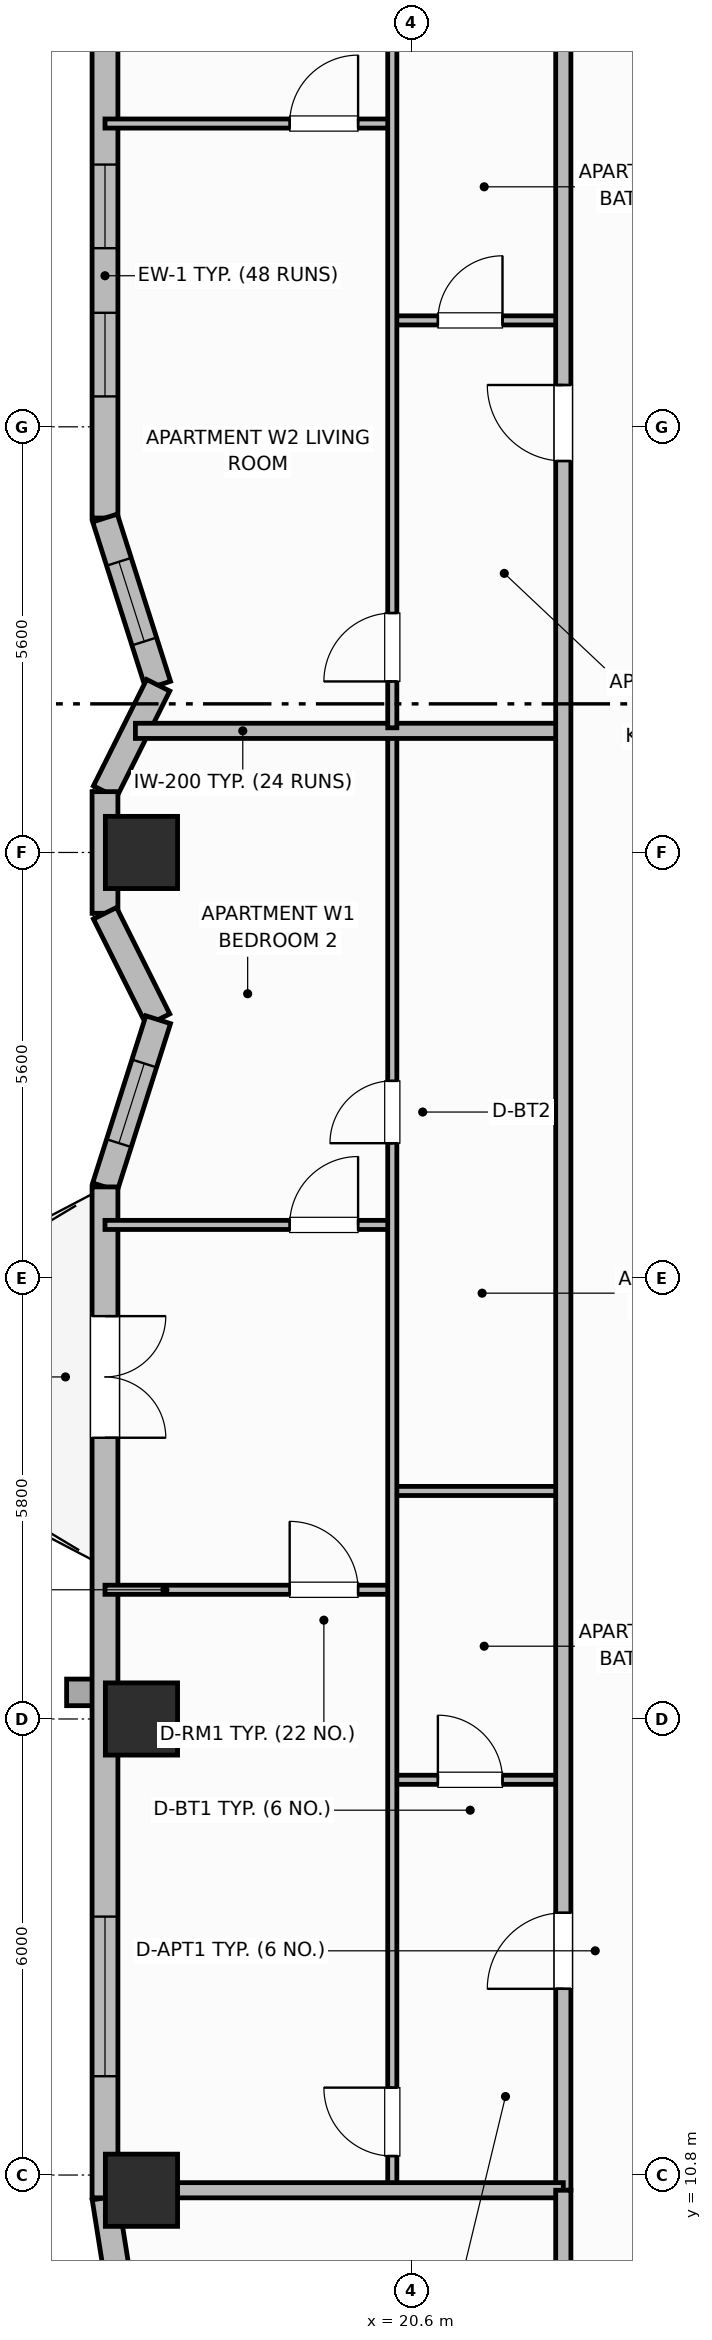
"""IFC4 building model, lengths in metres.
Left out: names, types, materials, properties, quantities, classifications, styles, units other than length and angle.
Written with IfcOpenShell. Run it as: python <this file> out.ifc"""

import sys

from ifc_helpers import new_model, si_unit, direction, frame, frame_2d, origin, origin_2d, place, context, subcontext, project, spatial, rectangle, extrude, element, fill, save


model = new_model("IFC4")
c1 = context("Model", 3, precision=1e-05, world=origin(), true_north=direction((0.0, 1.0)))
c2 = subcontext(c1, "Body", "Model", "MODEL_VIEW")
j1 = project(units=[si_unit("LENGTHUNIT", "METRE"), si_unit("PLANEANGLEUNIT", "RADIAN")], contexts=[c1])
p1 = place(None, origin())
s1 = spatial("IfcSite", under=j1, at=p1, CompositionType="ELEMENT")
p2 = place(p1, origin())
s2 = spatial("IfcBuilding", under=s1, at=p2, CompositionType="ELEMENT")
p3 = place(p2, frame((0.0, 0.0, 177.4)))
s3 = spatial("IfcBuildingStorey", under=s2, at=p3, CompositionType="ELEMENT", Elevation=177.4)
for number, where, z_axis, x_axis in (
    (1, (17.05, 10.6, 0.0), (0.0, 0.0, 1.0), (1.0, 0.0, 0.0)),
    (2, (17.05, 16.8, 0.0), (0.0, 0.0, 1.0), (1.0, 0.0, 0.0)),
    (3, (17.05, 28.2, 0.0), (0.0, 0.0, 1.0), (1.0, 0.0, 0.0)),
):
    element("IfcColumn", number, at=place(p3, frame(where, z_axis=z_axis, x_axis=x_axis)), inside=s3, PredefinedType="COLUMN", context=c2, shape_type="SweptSolid", body=[
        extrude(rectangle(XDim=0.95, YDim=0.95, at=origin_2d()), origin(), (0.0, 0.0, 1.0), 3.7),
    ])
p4 = place(p3, frame((16.57, 10.5, 0.0), z_axis=(0.0, 0.0, 1.0), x_axis=(0.156514556949, -0.987675651954, 0.0)))
e4 = element("IfcWall", 4, at=p4, inside=s3, PredefinedType="SOLIDWALL", context=c2, shape_type="SweptSolid", body=[
    extrude(rectangle(XDim=1.135, YDim=0.34, at=frame_2d((0.568, 0.0))), origin(), (0.0, 0.0, 1.0), 2.72),
])
p5 = place(p3, frame((16.57, 45.9, 0.0), z_axis=(0.0, 0.0, 1.0), x_axis=(0.0, -1.0, 0.0)))
e5 = element("IfcWall", 5, at=p5, inside=s3, PredefinedType="SOLIDWALL", context=c2, shape_type="SweptSolid", body=[
    extrude(rectangle(XDim=13.3, YDim=0.34, at=frame_2d((6.65, 0.0))), origin(), (0.0, 0.0, 1.0), 2.72),
])
p6 = place(p5, frame((1.6, 0.0, 0.95)))
e6 = element("IfcOpeningElement", 6, at=p6, cuts=e5, PredefinedType="OPENING", context=c2, shape_type="SweptSolid", body=[
    extrude(rectangle(XDim=1.1, YDim=1.65, at=frame_2d((0.55, 0.825))), frame((0.0, 0.18, 0.0), z_axis=(0.0, -1.0, 0.0), x_axis=(1.0, 0.0, 0.0)), (0.0, 0.0, 1.0), 0.36),
])
p7 = place(p5, frame((3.9, 0.0, 0.95)))
e7 = element("IfcOpeningElement", 7, at=p7, cuts=e5, PredefinedType="OPENING", context=c2, shape_type="SweptSolid", body=[
    extrude(rectangle(XDim=1.1, YDim=1.65, at=frame_2d((0.55, 0.825))), frame((0.0, 0.18, 0.0), z_axis=(0.0, -1.0, 0.0), x_axis=(1.0, 0.0, 0.0)), (0.0, 0.0, 1.0), 0.36),
])
p8 = place(p5, frame((8.65, 0.0, 0.95)))
e8 = element("IfcOpeningElement", 8, at=p8, cuts=e5, PredefinedType="OPENING", context=c2, shape_type="SweptSolid", body=[
    extrude(rectangle(XDim=1.1, YDim=1.65, at=frame_2d((0.55, 0.825))), frame((0.0, 0.18, 0.0), z_axis=(0.0, -1.0, 0.0), x_axis=(1.0, 0.0, 0.0)), (0.0, 0.0, 1.0), 0.36),
])
p9 = place(p5, frame((10.6, 0.0, 0.95)))
e9 = element("IfcOpeningElement", 9, at=p9, cuts=e5, PredefinedType="OPENING", context=c2, shape_type="SweptSolid", body=[
    extrude(rectangle(XDim=1.1, YDim=1.65, at=frame_2d((0.55, 0.825))), frame((0.0, 0.18, 0.0), z_axis=(0.0, -1.0, 0.0), x_axis=(1.0, 0.0, 0.0)), (0.0, 0.0, 1.0), 0.36),
])
p10 = place(p3, frame((16.57, 32.6, 0.0), z_axis=(0.0, 0.0, 1.0), x_axis=(0.303160011437, -0.952939666225, 0.0)))
e10 = element("IfcWall", 10, at=p10, inside=s3, PredefinedType="SOLIDWALL", context=c2, shape_type="SweptSolid", body=[
    extrude(rectangle(XDim=2.309, YDim=0.34, at=frame_2d((1.154, 0.0))), origin(), (0.0, 0.0, 1.0), 2.72),
])
p11 = place(p10, frame((0.604, 0.0, 0.91)))
e11 = element("IfcOpeningElement", 11, at=p11, cuts=e10, PredefinedType="OPENING", context=c2, shape_type="SweptSolid", body=[
    extrude(rectangle(XDim=1.1, YDim=1.65, at=frame_2d((0.55, 0.825))), frame((0.0, 0.18, 0.0), z_axis=(0.0, -1.0, 0.0), x_axis=(1.0, 0.0, 0.0)), (0.0, 0.0, 1.0), 0.36),
])
p12 = place(p3, frame((17.27, 30.4, 0.0), z_axis=(0.0, 0.0, 1.0), x_axis=(-0.4472135955, -0.894427191, 0.0)))
e12 = element("IfcWall", 12, at=p12, inside=s3, PredefinedType="SOLIDWALL", context=c2, shape_type="SweptSolid", body=[
    extrude(rectangle(XDim=1.565, YDim=0.34, at=frame_2d((0.783, 0.0))), origin(), (0.0, 0.0, 1.0), 2.72),
])
p13 = place(p3, frame((16.57, 29.0, 0.0), z_axis=(0.0, 0.0, 1.0), x_axis=(0.0, -1.0, 0.0)))
e13 = element("IfcWall", 13, at=p13, inside=s3, PredefinedType="SOLIDWALL", context=c2, shape_type="SweptSolid", body=[
    extrude(rectangle(XDim=1.6, YDim=0.34, at=frame_2d((0.8, 0.0))), origin(), (0.0, 0.0, 1.0), 2.72),
])
p14 = place(p3, frame((16.57, 27.4, 0.0), z_axis=(0.0, 0.0, 1.0), x_axis=(0.4472135955, -0.894427191, 0.0)))
e14 = element("IfcWall", 14, at=p14, inside=s3, PredefinedType="SOLIDWALL", context=c2, shape_type="SweptSolid", body=[
    extrude(rectangle(XDim=1.565, YDim=0.34, at=frame_2d((0.783, 0.0))), origin(), (0.0, 0.0, 1.0), 2.72),
])
p15 = place(p3, frame((17.27, 26.0, 0.0), z_axis=(0.0, 0.0, 1.0), x_axis=(-0.303190562272, -0.952929946507, 0.0)))
e15 = element("IfcWall", 15, at=p15, inside=s3, PredefinedType="SOLIDWALL", context=c2, shape_type="SweptSolid", body=[
    extrude(rectangle(XDim=2.309, YDim=0.34, at=frame_2d((1.154, 0.0))), origin(), (0.0, 0.0, 1.0), 2.72),
])
p16 = place(p15, frame((0.604, 0.0, 0.91)))
e16 = element("IfcOpeningElement", 16, at=p16, cuts=e15, PredefinedType="OPENING", context=c2, shape_type="SweptSolid", body=[
    extrude(rectangle(XDim=1.1, YDim=1.65, at=frame_2d((0.55, 0.825))), frame((0.0, 0.18, 0.0), z_axis=(0.0, -1.0, 0.0), x_axis=(1.0, 0.0, 0.0)), (0.0, 0.0, 1.0), 0.36),
])
p17 = place(p3, frame((16.57, 23.8, 0.0), z_axis=(0.0, 0.0, 1.0), x_axis=(0.0, -1.0, 0.0)))
e17 = element("IfcWall", 17, at=p17, inside=s3, PredefinedType="SOLIDWALL", context=c2, shape_type="SweptSolid", body=[
    extrude(rectangle(XDim=13.3, YDim=0.34, at=frame_2d((6.65, 0.0))), origin(), (0.0, 0.0, 1.0), 2.72),
])
p18 = place(p17, frame((1.7, 0.0, 0.0)))
e18 = element("IfcOpeningElement", 18, at=p18, cuts=e17, PredefinedType="OPENING", context=c2, shape_type="SweptSolid", body=[
    extrude(rectangle(XDim=1.6, YDim=2.1, at=frame_2d((0.8, 1.05))), frame((0.0, 0.18, 0.0), z_axis=(0.0, -1.0, 0.0), x_axis=(1.0, 0.0, 0.0)), (0.0, 0.0, 1.0), 0.36),
])
p19 = place(p17, frame((9.6, 0.0, 0.7)))
e19 = element("IfcOpeningElement", 19, at=p19, cuts=e17, PredefinedType="OPENING", context=c2, shape_type="SweptSolid", body=[
    extrude(rectangle(XDim=2.1, YDim=1.9, at=frame_2d((1.05, 0.95))), frame((0.0, 0.18, 0.0), z_axis=(0.0, -1.0, 0.0), x_axis=(1.0, 0.0, 0.0)), (0.0, 0.0, 1.0), 0.36),
])
p20 = place(p3, frame((20.35, 16.0, 0.0), z_axis=(0.0, 0.0, 1.0), x_axis=(1.0, 0.0, 0.0)))
e20 = element("IfcWall", 20, at=p20, inside=s3, PredefinedType="PARTITIONING", context=c2, shape_type="SweptSolid", body=[
    extrude(rectangle(XDim=2.25, YDim=0.12, at=frame_2d((1.125, 0.0))), origin(), (0.0, 0.0, 1.0), 2.55),
])
p21 = place(p20, frame((0.6, 0.0, 0.0)))
e21 = element("IfcOpeningElement", 21, at=p21, cuts=e20, PredefinedType="OPENING", context=c2, shape_type="SweptSolid", body=[
    extrude(rectangle(XDim=0.85, YDim=2.1, at=frame_2d((0.425, 1.05))), frame((0.0, 0.07, 0.0), z_axis=(0.0, -1.0, 0.0), x_axis=(1.0, 0.0, 0.0)), (0.0, 0.0, 1.0), 0.14),
])
p22 = place(p3, frame((20.35, 19.8, 0.0), z_axis=(0.0, 0.0, 1.0), x_axis=(1.0, 0.0, 0.0)))
e22 = element("IfcWall", 22, at=p22, inside=s3, PredefinedType="PARTITIONING", context=c2, shape_type="SweptSolid", body=[
    extrude(rectangle(XDim=2.25, YDim=0.12, at=frame_2d((1.125, 0.0))), origin(), (0.0, 0.0, 1.0), 2.55),
])
p23 = place(p3, frame((16.57, 18.5, 0.0), z_axis=(0.0, 0.0, 1.0), x_axis=(1.0, 0.0, 0.0)))
e23 = element("IfcWall", 23, at=p23, inside=s3, PredefinedType="PARTITIONING", context=c2, shape_type="SweptSolid", body=[
    extrude(rectangle(XDim=3.78, YDim=0.12, at=frame_2d((1.89, 0.0))), origin(), (0.0, 0.0, 1.0), 2.55),
])
p24 = place(p23, frame((2.43, 0.0, 0.0)))
e24 = element("IfcOpeningElement", 24, at=p24, cuts=e23, PredefinedType="OPENING", context=c2, shape_type="SweptSolid", body=[
    extrude(rectangle(XDim=0.9, YDim=2.1, at=frame_2d((0.45, 1.05))), frame((0.0, 0.07, 0.0), z_axis=(0.0, -1.0, 0.0), x_axis=(1.0, 0.0, 0.0)), (0.0, 0.0, 1.0), 0.14),
])
p25 = place(p3, frame((16.57, 23.3, 0.0), z_axis=(0.0, 0.0, 1.0), x_axis=(1.0, 0.0, 0.0)))
e25 = element("IfcWall", 25, at=p25, inside=s3, PredefinedType="PARTITIONING", context=c2, shape_type="SweptSolid", body=[
    extrude(rectangle(XDim=3.78, YDim=0.12, at=frame_2d((1.89, 0.0))), origin(), (0.0, 0.0, 1.0), 2.55),
])
p26 = place(p25, frame((2.43, 0.0, 0.0)))
e26 = element("IfcOpeningElement", 26, at=p26, cuts=e25, PredefinedType="OPENING", context=c2, shape_type="SweptSolid", body=[
    extrude(rectangle(XDim=0.9, YDim=2.1, at=frame_2d((0.45, 1.05))), frame((0.0, 0.07, 0.0), z_axis=(0.0, -1.0, 0.0), x_axis=(1.0, 0.0, 0.0)), (0.0, 0.0, 1.0), 0.14),
])
p27 = place(p3, frame((20.35, 10.64, 0.0), z_axis=(0.0, 0.0, 1.0), x_axis=(0.0, 1.0, 0.0)))
e27 = element("IfcWall", 27, at=p27, inside=s3, PredefinedType="PARTITIONING", context=c2, shape_type="SweptSolid", body=[
    extrude(rectangle(XDim=19.12, YDim=0.12, at=frame_2d((9.56, 0.0))), origin(), (0.0, 0.0, 1.0), 2.55),
])
p28 = place(p27, frame((0.41, 0.0, 0.0)))
e28 = element("IfcOpeningElement", 28, at=p28, cuts=e27, PredefinedType="OPENING", context=c2, shape_type="SweptSolid", body=[
    extrude(rectangle(XDim=0.9, YDim=2.1, at=frame_2d((0.45, 1.05))), frame((0.0, 0.07, 0.0), z_axis=(0.0, -1.0, 0.0), x_axis=(1.0, 0.0, 0.0)), (0.0, 0.0, 1.0), 0.14),
])
p29 = place(p27, frame((13.735, 0.0, 0.0)))
e29 = element("IfcOpeningElement", 29, at=p29, cuts=e27, PredefinedType="OPENING", context=c2, shape_type="SweptSolid", body=[
    extrude(rectangle(XDim=0.82, YDim=2.08, at=frame_2d((0.41, 1.04))), frame((0.0, 0.07, 0.0), z_axis=(0.0, -1.0, 0.0), x_axis=(1.0, 0.0, 0.0)), (0.0, 0.0, 1.0), 0.14),
])
p30 = place(p3, frame((16.97, 29.8, 0.0), z_axis=(0.0, 0.0, 1.0), x_axis=(1.0, 0.0, 0.0)))
e30 = element("IfcWall", 30, at=p30, inside=s3, PredefinedType="PARTITIONING", context=c2, shape_type="SweptSolid", body=[
    extrude(rectangle(XDim=5.63, YDim=0.2, at=frame_2d((2.815, 0.0))), origin(), (0.0, 0.0, 1.0), 2.55),
])
p31 = place(p3, frame((20.35, 35.2, 0.0), z_axis=(0.0, 0.0, 1.0), x_axis=(1.0, 0.0, 0.0)))
e31 = element("IfcWall", 31, at=p31, inside=s3, PredefinedType="PARTITIONING", context=c2, shape_type="SweptSolid", body=[
    extrude(rectangle(XDim=2.25, YDim=0.12, at=frame_2d((1.125, 0.0))), origin(), (0.0, 0.0, 1.0), 2.55),
])
p32 = place(p31, frame((0.6, 0.0, 0.0)))
e32 = element("IfcOpeningElement", 32, at=p32, cuts=e31, PredefinedType="OPENING", context=c2, shape_type="SweptSolid", body=[
    extrude(rectangle(XDim=0.85, YDim=2.1, at=frame_2d((0.425, 1.05))), frame((0.0, 0.07, 0.0), z_axis=(0.0, -1.0, 0.0), x_axis=(1.0, 0.0, 0.0)), (0.0, 0.0, 1.0), 0.14),
])
p33 = place(p3, frame((16.57, 37.79, 0.0), z_axis=(0.0, 0.0, 1.0), x_axis=(1.0, 0.0, 0.0)))
e33 = element("IfcWall", 33, at=p33, inside=s3, PredefinedType="PARTITIONING", context=c2, shape_type="SweptSolid", body=[
    extrude(rectangle(XDim=3.78, YDim=0.12, at=frame_2d((1.89, 0.0))), origin(), (0.0, 0.0, 1.0), 2.55),
])
p34 = place(p33, frame((2.43, 0.0, 0.0)))
e34 = element("IfcOpeningElement", 34, at=p34, cuts=e33, PredefinedType="OPENING", context=c2, shape_type="SweptSolid", body=[
    extrude(rectangle(XDim=0.9, YDim=2.1, at=frame_2d((0.45, 1.05))), frame((0.0, 0.07, 0.0), z_axis=(0.0, -1.0, 0.0), x_axis=(1.0, 0.0, 0.0)), (0.0, 0.0, 1.0), 0.14),
])
p35 = place(p3, frame((20.35, 29.84, 0.0), z_axis=(0.0, 0.0, 1.0), x_axis=(0.0, 1.0, 0.0)))
e35 = element("IfcWall", 35, at=p35, inside=s3, PredefinedType="PARTITIONING", context=c2, shape_type="SweptSolid", body=[
    extrude(rectangle(XDim=15.92, YDim=0.12, at=frame_2d((7.96, 0.0))), origin(), (0.0, 0.0, 1.0), 2.55),
])
p36 = place(p35, frame((0.61, 0.0, 0.0)))
e36 = element("IfcOpeningElement", 36, at=p36, cuts=e35, PredefinedType="OPENING", context=c2, shape_type="SweptSolid", body=[
    extrude(rectangle(XDim=0.9, YDim=2.1, at=frame_2d((0.45, 1.05))), frame((0.0, 0.07, 0.0), z_axis=(0.0, -1.0, 0.0), x_axis=(1.0, 0.0, 0.0)), (0.0, 0.0, 1.0), 0.14),
])
p37 = place(p35, frame((12.135, 0.0, 0.0)))
e37 = element("IfcOpeningElement", 37, at=p37, cuts=e35, PredefinedType="OPENING", context=c2, shape_type="SweptSolid", body=[
    extrude(rectangle(XDim=0.82, YDim=2.08, at=frame_2d((0.41, 1.04))), frame((0.0, 0.07, 0.0), z_axis=(0.0, -1.0, 0.0), x_axis=(1.0, 0.0, 0.0)), (0.0, 0.0, 1.0), 0.14),
])
p38 = place(p3, frame((22.6, 10.6, 0.0), z_axis=(0.0, 0.0, 1.0), x_axis=(0.0, 1.0, 0.0)))
e38 = element("IfcWall", 38, at=p38, inside=s3, PredefinedType="PARTITIONING", context=c2, shape_type="SweptSolid", body=[
    extrude(rectangle(XDim=35.2, YDim=0.2, at=frame_2d((17.6, 0.0))), origin(), (0.0, 0.0, 1.0), 2.55),
])
p39 = place(p38, frame((2.65, 0.0, 0.0)))
e39 = element("IfcOpeningElement", 39, at=p39, cuts=e38, PredefinedType="OPENING", context=c2, shape_type="SweptSolid", body=[
    extrude(rectangle(XDim=1.0, YDim=2.15, at=frame_2d((0.5, 1.075))), frame((0.0, 0.11, 0.0), z_axis=(0.0, -1.0, 0.0), x_axis=(1.0, 0.0, 0.0)), (0.0, 0.0, 1.0), 0.22),
])
p40 = place(p38, frame((22.75, 0.0, 0.0)))
e40 = element("IfcOpeningElement", 40, at=p40, cuts=e38, PredefinedType="OPENING", context=c2, shape_type="SweptSolid", body=[
    extrude(rectangle(XDim=1.0, YDim=2.15, at=frame_2d((0.5, 1.075))), frame((0.0, 0.11, 0.0), z_axis=(0.0, -1.0, 0.0), x_axis=(1.0, 0.0, 0.0)), (0.0, 0.0, 1.0), 0.22),
])
p41 = place(p3, frame((16.99, 10.6, 0.0), z_axis=(0.0, 0.0, 1.0), x_axis=(1.0, 0.0, 0.0)))
e41 = element("IfcWall", 41, at=p41, inside=s3, PredefinedType="PARTITIONING", context=c2, shape_type="SweptSolid", body=[
    extrude(rectangle(XDim=5.61, YDim=0.2, at=frame_2d((2.805, 0.0))), origin(), (0.0, 0.0, 1.0), 2.55),
])
p42 = place(p3, frame((22.6, 6.87, 0.0), z_axis=(0.0, 0.0, 1.0), x_axis=(0.0, 1.0, 0.0)))
e42 = element("IfcWall", 42, at=p42, inside=s3, PredefinedType="PARTITIONING", context=c2, shape_type="SweptSolid", body=[
    extrude(rectangle(XDim=3.73, YDim=0.2, at=frame_2d((1.865, 0.0))), origin(), (0.0, 0.0, 1.0), 2.55),
])
p43 = place(p8, origin())
e43 = element("IfcWindow", 43, at=p43, inside=s3, PartitioningType="SINGLE_PANEL", PredefinedType="WINDOW", context=c2, shape_type="SweptSolid", body=[
    extrude(rectangle(XDim=1.1, YDim=1.65, at=frame_2d((0.55, 0.825))), frame((0.0, 0.03, 0.0), z_axis=(0.0, -1.0, 0.0), x_axis=(1.0, 0.0, 0.0)), (0.0, 0.0, 1.0), 0.06),
])
fill(e8, e43)
p44 = place(p9, origin())
e44 = element("IfcWindow", 44, at=p44, inside=s3, PartitioningType="SINGLE_PANEL", PredefinedType="WINDOW", context=c2, shape_type="SweptSolid", body=[
    extrude(rectangle(XDim=1.1, YDim=1.65, at=frame_2d((0.55, 0.825))), frame((0.0, 0.03, 0.0), z_axis=(0.0, -1.0, 0.0), x_axis=(1.0, 0.0, 0.0)), (0.0, 0.0, 1.0), 0.06),
])
fill(e9, e44)
p45 = place(p11, origin())
e45 = element("IfcWindow", 45, at=p45, inside=s3, PartitioningType="SINGLE_PANEL", PredefinedType="WINDOW", context=c2, shape_type="SweptSolid", body=[
    extrude(rectangle(XDim=1.1, YDim=1.65, at=frame_2d((0.55, 0.825))), frame((0.0, 0.03, 0.0), z_axis=(0.0, -1.0, 0.0), x_axis=(1.0, 0.0, 0.0)), (0.0, 0.0, 1.0), 0.06),
])
fill(e11, e45)
p46 = place(p16, origin())
e46 = element("IfcWindow", 46, at=p46, inside=s3, PartitioningType="SINGLE_PANEL", PredefinedType="WINDOW", context=c2, shape_type="SweptSolid", body=[
    extrude(rectangle(XDim=1.1, YDim=1.65, at=frame_2d((0.55, 0.825))), frame((0.0, 0.03, 0.0), z_axis=(0.0, -1.0, 0.0), x_axis=(1.0, 0.0, 0.0)), (0.0, 0.0, 1.0), 0.06),
])
fill(e16, e46)
p47 = place(p18, origin())
e47 = element("IfcDoor", 47, at=p47, inside=s3, OperationType="DOUBLE_DOOR_SINGLE_SWING", PredefinedType="DOOR", context=c2, shape_type="SweptSolid", body=[
    extrude(rectangle(XDim=1.6, YDim=2.1, at=frame_2d((0.8, 1.05))), frame((0.0, 0.025, 0.0), z_axis=(0.0, -1.0, 0.0), x_axis=(1.0, 0.0, 0.0)), (0.0, 0.0, 1.0), 0.05),
])
fill(e18, e47)
p48 = place(p19, origin())
e48 = element("IfcWindow", 48, at=p48, inside=s3, PartitioningType="SINGLE_PANEL", PredefinedType="WINDOW", context=c2, shape_type="SweptSolid", body=[
    extrude(rectangle(XDim=2.1, YDim=1.9, at=frame_2d((1.05, 0.95))), frame((0.0, 0.03, 0.0), z_axis=(0.0, -1.0, 0.0), x_axis=(1.0, 0.0, 0.0)), (0.0, 0.0, 1.0), 0.06),
])
fill(e19, e48)
p49 = place(p21, origin())
e49 = element("IfcDoor", 49, at=p49, inside=s3, OperationType="SINGLE_SWING_LEFT", PredefinedType="DOOR", context=c2, shape_type="SweptSolid", body=[
    extrude(rectangle(XDim=0.85, YDim=2.1, at=frame_2d((0.425, 1.05))), frame((0.0, 0.025, 0.0), z_axis=(0.0, -1.0, 0.0), x_axis=(1.0, 0.0, 0.0)), (0.0, 0.0, 1.0), 0.05),
])
fill(e21, e49)
p50 = place(p24, origin())
e50 = element("IfcDoor", 50, at=p50, inside=s3, OperationType="SINGLE_SWING_LEFT", PredefinedType="DOOR", context=c2, shape_type="SweptSolid", body=[
    extrude(rectangle(XDim=0.9, YDim=2.1, at=frame_2d((0.45, 1.05))), frame((0.0, 0.025, 0.0), z_axis=(0.0, -1.0, 0.0), x_axis=(1.0, 0.0, 0.0)), (0.0, 0.0, 1.0), 0.05),
])
fill(e24, e50)
p51 = place(p26, origin())
e51 = element("IfcDoor", 51, at=p51, inside=s3, OperationType="SINGLE_SWING_RIGHT", PredefinedType="DOOR", context=c2, shape_type="SweptSolid", body=[
    extrude(rectangle(XDim=0.9, YDim=2.1, at=frame_2d((0.45, 1.05))), frame((0.0, 0.025, 0.0), z_axis=(0.0, -1.0, 0.0), x_axis=(1.0, 0.0, 0.0)), (0.0, 0.0, 1.0), 0.05),
])
fill(e26, e51)
p52 = place(p28, origin())
e52 = element("IfcDoor", 52, at=p52, inside=s3, OperationType="SINGLE_SWING_RIGHT", PredefinedType="DOOR", context=c2, shape_type="SweptSolid", body=[
    extrude(rectangle(XDim=0.9, YDim=2.1, at=frame_2d((0.45, 1.05))), frame((0.0, 0.025, 0.0), z_axis=(0.0, -1.0, 0.0), x_axis=(1.0, 0.0, 0.0)), (0.0, 0.0, 1.0), 0.05),
])
fill(e28, e52)
p53 = place(p29, origin())
e53 = element("IfcDoor", 53, at=p53, inside=s3, OperationType="SINGLE_SWING_LEFT", PredefinedType="DOOR", context=c2, shape_type="SweptSolid", body=[
    extrude(rectangle(XDim=0.82, YDim=2.08, at=frame_2d((0.41, 1.04))), frame((0.0, 0.025, 0.0), z_axis=(0.0, -1.0, 0.0), x_axis=(1.0, 0.0, 0.0)), (0.0, 0.0, 1.0), 0.05),
])
fill(e29, e53)
p54 = place(p32, origin())
e54 = element("IfcDoor", 54, at=p54, inside=s3, OperationType="SINGLE_SWING_RIGHT", PredefinedType="DOOR", context=c2, shape_type="SweptSolid", body=[
    extrude(rectangle(XDim=0.85, YDim=2.1, at=frame_2d((0.425, 1.05))), frame((0.0, 0.025, 0.0), z_axis=(0.0, -1.0, 0.0), x_axis=(1.0, 0.0, 0.0)), (0.0, 0.0, 1.0), 0.05),
])
fill(e32, e54)
p55 = place(p34, origin())
e55 = element("IfcDoor", 55, at=p55, inside=s3, OperationType="SINGLE_SWING_RIGHT", PredefinedType="DOOR", context=c2, shape_type="SweptSolid", body=[
    extrude(rectangle(XDim=0.9, YDim=2.1, at=frame_2d((0.45, 1.05))), frame((0.0, 0.025, 0.0), z_axis=(0.0, -1.0, 0.0), x_axis=(1.0, 0.0, 0.0)), (0.0, 0.0, 1.0), 0.05),
])
fill(e34, e55)
p56 = place(p36, origin())
e56 = element("IfcDoor", 56, at=p56, inside=s3, OperationType="SINGLE_SWING_LEFT", PredefinedType="DOOR", context=c2, shape_type="SweptSolid", body=[
    extrude(rectangle(XDim=0.9, YDim=2.1, at=frame_2d((0.45, 1.05))), frame((0.0, 0.025, 0.0), z_axis=(0.0, -1.0, 0.0), x_axis=(1.0, 0.0, 0.0)), (0.0, 0.0, 1.0), 0.05),
])
fill(e36, e56)
p57 = place(p39, origin())
e57 = element("IfcDoor", 57, at=p57, inside=s3, OperationType="SINGLE_SWING_LEFT", PredefinedType="DOOR", context=c2, shape_type="SweptSolid", body=[
    extrude(rectangle(XDim=1.0, YDim=2.15, at=frame_2d((0.5, 1.075))), frame((0.0, 0.025, 0.0), z_axis=(0.0, -1.0, 0.0), x_axis=(1.0, 0.0, 0.0)), (0.0, 0.0, 1.0), 0.05),
])
fill(e39, e57)
p58 = place(p40, origin())
e58 = element("IfcDoor", 58, at=p58, inside=s3, OperationType="SINGLE_SWING_RIGHT", PredefinedType="DOOR", context=c2, shape_type="SweptSolid", body=[
    extrude(rectangle(XDim=1.0, YDim=2.15, at=frame_2d((0.5, 1.075))), frame((0.0, 0.025, 0.0), z_axis=(0.0, -1.0, 0.0), x_axis=(1.0, 0.0, 0.0)), (0.0, 0.0, 1.0), 0.05),
])
fill(e40, e58)
save(model, sys.argv[1])
